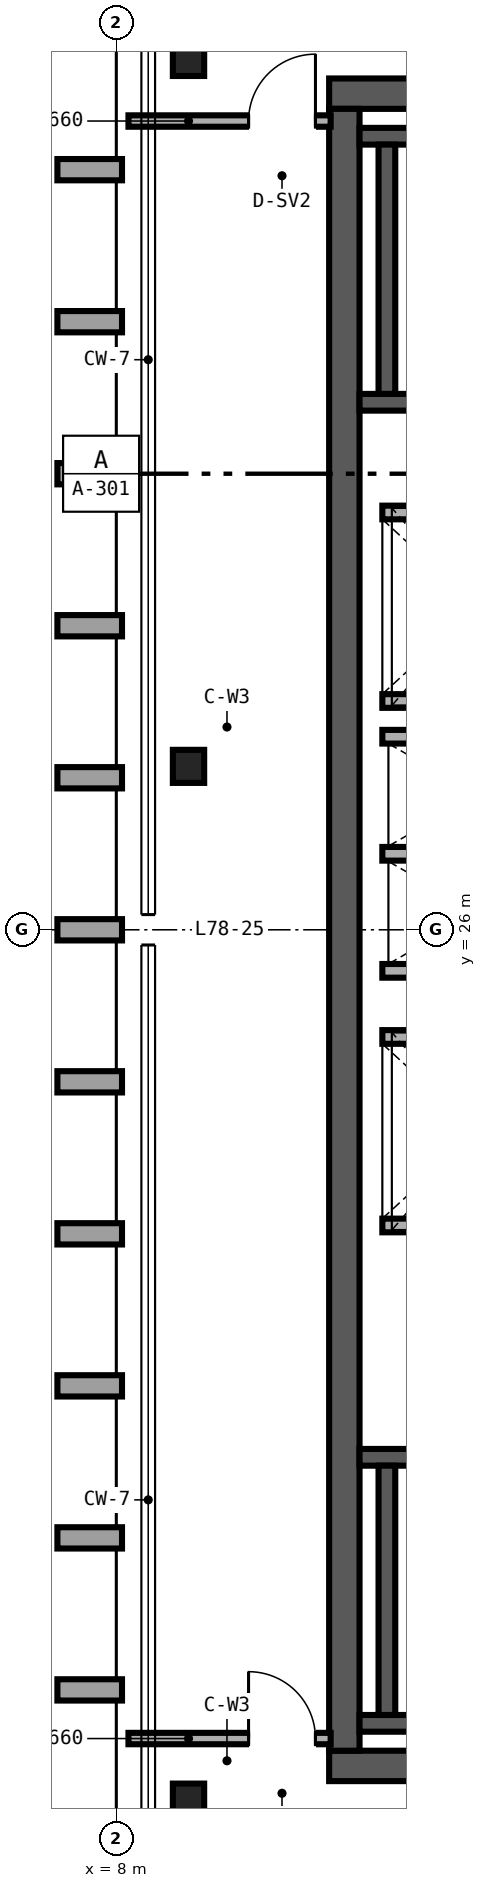
"""IFC4 building model, lengths in metres.
Left out: names, types, materials, properties, quantities, classifications, styles, units other than length and angle.
Written with IfcOpenShell. Run it as: python <this file> out.ifc"""

import sys

from ifc_helpers import new_model, si_unit, direction, frame, frame_2d, origin, origin_2d, place, context, subcontext, project, spatial, rectangle, i_section, extrude, source, transform, mapped, element, fill, save


model = new_model("IFC4")
c1 = context("Model", 3, precision=1e-05, world=origin(), true_north=direction((0.0, 1.0)))
c2 = subcontext(c1, "Body", "Model", "MODEL_VIEW")
j1 = project(units=[si_unit("LENGTHUNIT", "METRE"), si_unit("PLANEANGLEUNIT", "RADIAN")], contexts=[c1])
p1 = place(None, origin())
s1 = spatial("IfcSite", under=j1, at=p1, CompositionType="ELEMENT")
p2 = place(p1, origin())
s2 = spatial("IfcBuilding", under=s1, at=p2, CompositionType="ELEMENT")
p3 = place(p2, frame((0.0, 0.0, 305.4)))
s3 = spatial("IfcBuildingStorey", under=s2, at=p3, CompositionType="ELEMENT", Elevation=305.4)
p4 = place(p3, frame((10.8, 15.0, 0.0), z_axis=(0.0, 0.0, 1.0), x_axis=(1.0, 0.0, 0.0)))
e1 = element("IfcWall", 1, at=p4, inside=s3, PredefinedType="SHEAR", context=c2, shape_type="SweptSolid", body=[
    extrude(rectangle(XDim=12.4, YDim=0.4, at=frame_2d((6.2, 0.0))), origin(), (0.0, 0.0, 1.0), 3.88),
])
p5 = place(p4, frame((8.78, 0.0, 0.0)))
e2 = element("IfcOpeningElement", 2, at=p5, cuts=e1, PredefinedType="OPENING", context=c2, shape_type="SweptSolid", body=[
    extrude(rectangle(XDim=1.0, YDim=2.15, at=frame_2d((0.5, 1.075))), frame((0.0, 0.21, 0.0), z_axis=(0.0, -1.0, 0.0), x_axis=(1.0, 0.0, 0.0)), (0.0, 0.0, 1.0), 0.42),
])
p6 = place(p3, frame((10.8, 37.0, 0.0), z_axis=(0.0, 0.0, 1.0), x_axis=(1.0, 0.0, 0.0)))
e3 = element("IfcWall", 3, at=p6, inside=s3, PredefinedType="SHEAR", context=c2, shape_type="SweptSolid", body=[
    extrude(rectangle(XDim=12.4, YDim=0.4, at=frame_2d((6.2, 0.0))), origin(), (0.0, 0.0, 1.0), 3.88),
])
p7 = place(p6, frame((8.78, 0.0, 0.0)))
e4 = element("IfcOpeningElement", 4, at=p7, cuts=e3, PredefinedType="OPENING", context=c2, shape_type="SweptSolid", body=[
    extrude(rectangle(XDim=1.0, YDim=2.15, at=frame_2d((0.5, 1.075))), frame((0.0, 0.21, 0.0), z_axis=(0.0, -1.0, 0.0), x_axis=(1.0, 0.0, 0.0)), (0.0, 0.0, 1.0), 0.42),
])
p8 = place(p3, frame((11.0, 15.2, 0.0), z_axis=(0.0, 0.0, 1.0), x_axis=(0.0, 1.0, 0.0)))
e5 = element("IfcWall", 5, at=p8, inside=s3, PredefinedType="SHEAR", context=c2, shape_type="SweptSolid", body=[
    extrude(rectangle(XDim=21.6, YDim=0.4, at=frame_2d((10.8, 0.0))), origin(), (0.0, 0.0, 1.0), 3.88),
])
p9 = place(p3, frame((11.2, 15.56, 0.0), z_axis=(0.0, 0.0, 1.0), x_axis=(1.0, 0.0, 0.0)))
e6 = element("IfcWall", 6, at=p9, inside=s3, PredefinedType="SHEAR", context=c2, shape_type="SweptSolid", body=[
    extrude(rectangle(XDim=8.11, YDim=0.22, at=frame_2d((4.055, 0.0))), origin(), (0.0, 0.0, 1.0), 4.0),
])
p10 = place(p3, frame((11.2, 19.06, 0.0), z_axis=(0.0, 0.0, 1.0), x_axis=(1.0, 0.0, 0.0)))
e7 = element("IfcWall", 7, at=p10, inside=s3, PredefinedType="SHEAR", context=c2, shape_type="SweptSolid", body=[
    extrude(rectangle(XDim=8.11, YDim=0.22, at=frame_2d((4.055, 0.0))), origin(), (0.0, 0.0, 1.0), 4.0),
])
p11 = place(p10, frame((0.72, 0.0, 0.0)))
e8 = element("IfcOpeningElement", 8, at=p11, cuts=e7, PredefinedType="OPENING", context=c2, shape_type="SweptSolid", body=[
    extrude(rectangle(XDim=1.05, YDim=2.15, at=frame_2d((0.525, 1.075))), frame((0.0, 0.12, 0.0), z_axis=(0.0, -1.0, 0.0), x_axis=(1.0, 0.0, 0.0)), (0.0, 0.0, 1.0), 0.24),
])
p12 = place(p3, frame((11.56, 15.67, 0.0), z_axis=(0.0, 0.0, 1.0), x_axis=(0.0, 1.0, 0.0)))
e9 = element("IfcWall", 9, at=p12, inside=s3, PredefinedType="SHEAR", context=c2, shape_type="SweptSolid", body=[
    extrude(rectangle(XDim=3.28, YDim=0.22, at=frame_2d((1.64, 0.0))), origin(), (0.0, 0.0, 1.0), 4.0),
])
p13 = place(p3, frame((11.2, 32.94, 0.0), z_axis=(0.0, 0.0, 1.0), x_axis=(1.0, 0.0, 0.0)))
e10 = element("IfcWall", 10, at=p13, inside=s3, PredefinedType="SHEAR", context=c2, shape_type="SweptSolid", body=[
    extrude(rectangle(XDim=8.11, YDim=0.22, at=frame_2d((4.055, 0.0))), origin(), (0.0, 0.0, 1.0), 4.0),
])
p14 = place(p13, frame((0.72, 0.0, 0.0)))
e11 = element("IfcOpeningElement", 11, at=p14, cuts=e10, PredefinedType="OPENING", context=c2, shape_type="SweptSolid", body=[
    extrude(rectangle(XDim=1.05, YDim=2.15, at=frame_2d((0.525, 1.075))), frame((0.0, 0.12, 0.0), z_axis=(0.0, -1.0, 0.0), x_axis=(1.0, 0.0, 0.0)), (0.0, 0.0, 1.0), 0.24),
])
p15 = place(p3, frame((11.2, 36.44, 0.0), z_axis=(0.0, 0.0, 1.0), x_axis=(1.0, 0.0, 0.0)))
e12 = element("IfcWall", 12, at=p15, inside=s3, PredefinedType="SHEAR", context=c2, shape_type="SweptSolid", body=[
    extrude(rectangle(XDim=8.11, YDim=0.22, at=frame_2d((4.055, 0.0))), origin(), (0.0, 0.0, 1.0), 4.0),
])
p16 = place(p3, frame((11.56, 33.05, 0.0), z_axis=(0.0, 0.0, 1.0), x_axis=(0.0, 1.0, 0.0)))
e13 = element("IfcWall", 13, at=p16, inside=s3, PredefinedType="SHEAR", context=c2, shape_type="SweptSolid", body=[
    extrude(rectangle(XDim=3.28, YDim=0.22, at=frame_2d((1.64, 0.0))), origin(), (0.0, 0.0, 1.0), 4.0),
])
m1 = source(origin(), c2, "Body", "SweptSolid", [
    extrude(i_section(OverallWidth=0.412, OverallDepth=0.435, WebThickness=0.036, FlangeThickness=0.057, FilletRadius=0.025, at=origin_2d()), origin(), (0.0, 0.0, 1.0), 3.88),
])
for number, where, z_axis, x_axis in (
    (14, (8.95, 14.55, 0.0), (0.0, 0.0, 1.0), (1.0, 0.0, 0.0)),
    (15, (8.95, 28.15, 0.0), (0.0, 0.0, 1.0), (1.0, 0.0, 0.0)),
    (16, (8.95, 37.45, 0.0), (0.0, 0.0, 1.0), (1.0, 0.0, 0.0)),
):
    element("IfcColumn", number, at=place(p3, frame(where, z_axis=z_axis, x_axis=x_axis)), inside=s3, PredefinedType="COLUMN", context=c2, shape_type="MappedRepresentation", body=[
        mapped(m1, transform((0.0, 0.0, 0.0), scale=1.0)),
    ])
for number, where, z_axis, x_axis in (
    (17, (11.5, 22.11, 0.0), (0.0, 0.0, 1.0), (1.0, 0.0, 0.0)),
    (18, (11.5, 24.59, 0.0), (0.0, 0.0, 1.0), (1.0, 0.0, 0.0)),
    (19, (11.5, 29.01, 0.0), (0.0, 0.0, 1.0), (1.0, 0.0, 0.0)),
    (20, (11.5, 31.49, 0.0), (0.0, 0.0, 1.0), (1.0, 0.0, 0.0)),
):
    element("IfcWall", number, at=place(p3, frame(where, z_axis=z_axis, x_axis=x_axis)), inside=s3, PredefinedType="SOLIDWALL", context=c2, shape_type="SweptSolid", body=[
        extrude(rectangle(XDim=2.5, YDim=0.18, at=frame_2d((1.25, 0.0))), origin(), (0.0, 0.0, 1.0), 3.88),
    ])
for number, where, z_axis, x_axis in (
    (21, (11.5, 25.46, 0.0), (0.0, 0.0, 1.0), (1.0, 0.0, 0.0)),
    (22, (11.5, 27.0, 0.0), (0.0, 0.0, 1.0), (1.0, 0.0, 0.0)),
    (23, (11.5, 28.54, 0.0), (0.0, 0.0, 1.0), (1.0, 0.0, 0.0)),
):
    element("IfcWall", number, at=place(p3, frame(where, z_axis=z_axis, x_axis=x_axis)), inside=s3, PredefinedType="SOLIDWALL", context=c2, shape_type="SweptSolid", body=[
        extrude(rectangle(XDim=2.51, YDim=0.18, at=frame_2d((1.255, 0.0))), origin(), (0.0, 0.0, 1.0), 3.88),
    ])
p17 = place(p3, frame((8.16, 15.36, 0.0), z_axis=(0.0, 0.0, 1.0), x_axis=(1.0, 0.0, 0.0)))
e24 = element("IfcWall", 24, at=p17, inside=s3, PredefinedType="PARTITIONING", context=c2, shape_type="SweptSolid", body=[
    extrude(rectangle(XDim=2.66, YDim=0.15, at=frame_2d((1.33, 0.0))), origin(), (0.0, 0.0, 1.0), 3.101),
])
p18 = place(p17, frame((1.58, 0.0, 0.0)))
e25 = element("IfcOpeningElement", 25, at=p18, cuts=e24, PredefinedType="OPENING", context=c2, shape_type="SweptSolid", body=[
    extrude(rectangle(XDim=0.88, YDim=2.15, at=frame_2d((0.44, 1.075))), frame((0.0, 0.085, 0.0), z_axis=(0.0, -1.0, 0.0), x_axis=(1.0, 0.0, 0.0)), (0.0, 0.0, 1.0), 0.17),
])
p19 = place(p3, frame((8.16, 36.64, 0.0), z_axis=(0.0, 0.0, 1.0), x_axis=(1.0, 0.0, 0.0)))
e26 = element("IfcWall", 26, at=p19, inside=s3, PredefinedType="PARTITIONING", context=c2, shape_type="SweptSolid", body=[
    extrude(rectangle(XDim=2.66, YDim=0.15, at=frame_2d((1.33, 0.0))), origin(), (0.0, 0.0, 1.0), 3.263),
])
p20 = place(p19, frame((1.58, 0.0, 0.0)))
e27 = element("IfcOpeningElement", 27, at=p20, cuts=e26, PredefinedType="OPENING", context=c2, shape_type="SweptSolid", body=[
    extrude(rectangle(XDim=0.88, YDim=2.15, at=frame_2d((0.44, 1.075))), frame((0.0, 0.085, 0.0), z_axis=(0.0, -1.0, 0.0), x_axis=(1.0, 0.0, 0.0)), (0.0, 0.0, 1.0), 0.17),
])
m2 = source(origin(), c2, "Body", "SweptSolid", [
    extrude(rectangle(XDim=0.88, YDim=2.15, at=frame_2d((0.44, 1.075))), frame((0.0, 0.025, 0.0), z_axis=(0.0, -1.0, 0.0), x_axis=(1.0, 0.0, 0.0)), (0.0, 0.0, 1.0), 0.05),
])
p21 = place(p18, origin())
e28 = element("IfcDoor", 28, at=p21, inside=s3, OperationType="SINGLE_SWING_LEFT", PredefinedType="DOOR", context=c2, shape_type="MappedRepresentation", body=[
    mapped(m2, transform((0.0, 0.0, 0.0), scale=1.0)),
])
fill(e25, e28)
p22 = place(p20, origin())
e29 = element("IfcDoor", 29, at=p22, inside=s3, OperationType="SINGLE_SWING_RIGHT", PredefinedType="DOOR", context=c2, shape_type="MappedRepresentation", body=[
    mapped(m2, transform((0.0, 0.0, 0.0), scale=1.0)),
])
fill(e27, e29)
save(model, sys.argv[1])
